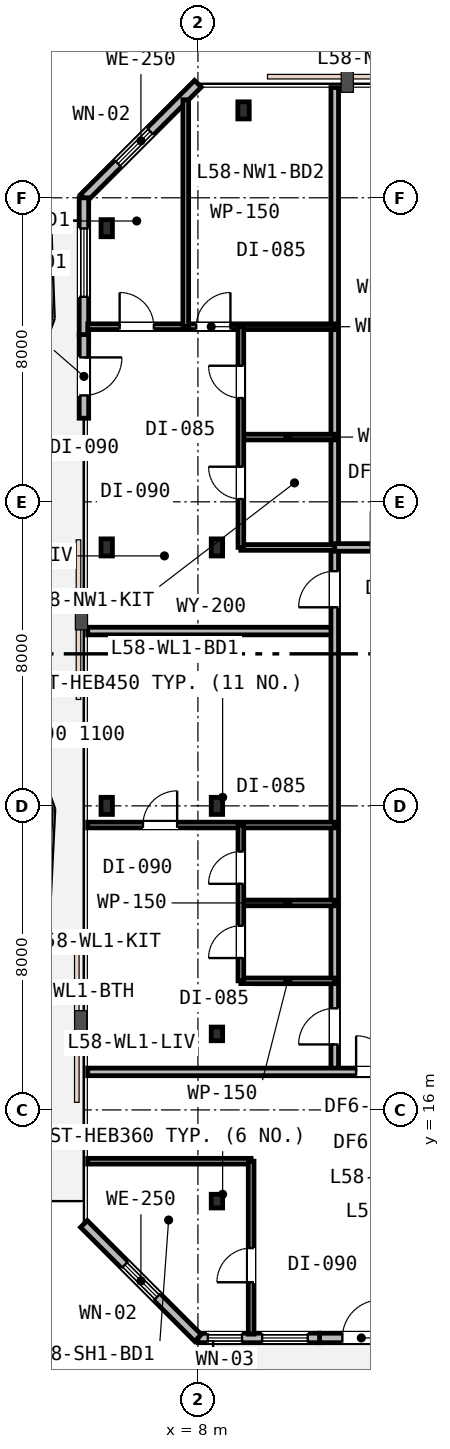
"""IFC4 building model, lengths in metres.
Left out: names, types, materials, properties, quantities, classifications, styles, units other than length and angle.
Written with IfcOpenShell. Run it as: python <this file> out.ifc"""

import sys

from ifc_helpers import new_model, si_unit, direction, frame, frame_2d, origin, origin_2d, place, context, subcontext, project, spatial, rectangle, i_section, extrude, element, fill, save


model = new_model("IFC4")
c1 = context("Model", 3, precision=1e-05, world=origin(), true_north=direction((0.0, 1.0)))
c2 = subcontext(c1, "Body", "Model", "MODEL_VIEW")
j1 = project(units=[si_unit("LENGTHUNIT", "METRE"), si_unit("PLANEANGLEUNIT", "RADIAN")], contexts=[c1])
p1 = place(None, origin())
s1 = spatial("IfcSite", under=j1, at=p1, CompositionType="ELEMENT")
p2 = place(p1, origin())
s2 = spatial("IfcBuilding", under=s1, at=p2, CompositionType="ELEMENT")
p3 = place(p2, frame((0.0, 0.0, 226.0)))
s3 = spatial("IfcBuildingStorey", under=s2, at=p3, CompositionType="ELEMENT", Elevation=226.0)
for number, where, z_axis, x_axis in (
    (1, (8.5, 24.0, 0.0), (0.0, 0.0, 1.0), (1.0, 0.0, 0.0)),
    (2, (5.6, 24.0, 0.0), (0.0, 0.0, 1.0), (1.0, 0.0, 0.0)),
    (3, (5.6, 30.8, 0.0), (0.0, 0.0, 1.0), (1.0, 0.0, 0.0)),
    (4, (5.6, 39.2, 0.0), (0.0, 0.0, 1.0), (1.0, 0.0, 0.0)),
    (5, (8.5, 30.8, 0.0), (0.0, 0.0, 1.0), (1.0, 0.0, 0.0)),
    (6, (9.2, 42.3, 0.0), (0.0, 0.0, 1.0), (1.0, 0.0, 0.0)),
):
    element("IfcColumn", number, at=place(p3, frame(where, z_axis=z_axis, x_axis=x_axis)), inside=s3, PredefinedType="COLUMN", context=c2, shape_type="SweptSolid", body=[
        extrude(i_section(OverallWidth=0.3, OverallDepth=0.45, WebThickness=0.014, FlangeThickness=0.026, FilletRadius=0.027, at=origin_2d()), origin(), (0.0, 0.0, 1.0), 3.8),
    ])
for number, where, z_axis, x_axis in (
    (7, (8.5, 13.6, 0.0), (0.0, 0.0, 1.0), (1.0, 0.0, 0.0)),
    (8, (8.5, 18.0, 0.0), (0.0, 0.0, 1.0), (1.0, 0.0, 0.0)),
):
    element("IfcColumn", number, at=place(p3, frame(where, z_axis=z_axis, x_axis=x_axis)), inside=s3, PredefinedType="COLUMN", context=c2, shape_type="SweptSolid", body=[
        extrude(i_section(OverallWidth=0.3, OverallDepth=0.36, WebThickness=0.013, FlangeThickness=0.022, FilletRadius=0.027, at=origin_2d()), origin(), (0.0, 0.0, 1.0), 3.8),
    ])
p4 = place(p3, frame((11.2, 10.0, 0.0), z_axis=(0.0, 0.0, 1.0), x_axis=(1.0, 0.0, 0.0)))
e9 = element("IfcWall", 9, at=p4, inside=s3, PredefinedType="STANDARD", context=c2, shape_type="SweptSolid", body=[
    extrude(rectangle(XDim=2.2, YDim=0.25, at=frame_2d((1.1, 0.0))), origin(), (0.0, 0.0, 1.0), 3.53),
])
p5 = place(p4, frame((0.6, 0.0, 0.0)))
e10 = element("IfcOpeningElement", 10, at=p5, cuts=e9, PredefinedType="OPENING", context=c2, shape_type="SweptSolid", body=[
    extrude(rectangle(XDim=1.0, YDim=2.15, at=frame_2d((0.5, 1.075))), frame((0.0, 0.135, 0.0), z_axis=(0.0, -1.0, 0.0), x_axis=(1.0, 0.0, 0.0)), (0.0, 0.0, 1.0), 0.27),
])
p6 = place(p3, frame((8.0, 10.0, 0.0), z_axis=(0.0, 0.0, 1.0), x_axis=(1.0, 0.0, 0.0)))
e11 = element("IfcWall", 11, at=p6, inside=s3, PredefinedType="STANDARD", context=c2, shape_type="SweptSolid", body=[
    extrude(rectangle(XDim=3.2, YDim=0.25, at=frame_2d((1.6, 0.0))), origin(), (0.0, 0.0, 1.0), 3.53),
])
p7 = place(p6, frame((0.26, 0.0, 0.9)))
e12 = element("IfcOpeningElement", 12, at=p7, cuts=e11, PredefinedType="OPENING", context=c2, shape_type="SweptSolid", body=[
    extrude(rectangle(XDim=0.9, YDim=1.55, at=frame_2d((0.45, 0.775))), frame((0.0, 0.135, 0.0), z_axis=(0.0, -1.0, 0.0), x_axis=(1.0, 0.0, 0.0)), (0.0, 0.0, 1.0), 0.27),
])
p8 = place(p6, frame((1.69, 0.0, 0.85)))
e13 = element("IfcOpeningElement", 13, at=p8, cuts=e11, PredefinedType="OPENING", context=c2, shape_type="SweptSolid", body=[
    extrude(rectangle(XDim=1.2, YDim=1.6, at=frame_2d((0.6, 0.8))), frame((0.0, 0.135, 0.0), z_axis=(0.0, -1.0, 0.0), x_axis=(1.0, 0.0, 0.0)), (0.0, 0.0, 1.0), 0.27),
])
p9 = place(p3, frame((8.0, 43.0, 0.0), z_axis=(0.0, 0.0, 1.0), x_axis=(-0.707106781187, -0.707106781187, 0.0)))
e14 = element("IfcWall", 14, at=p9, inside=s3, PredefinedType="STANDARD", context=c2, shape_type="SweptSolid", body=[
    extrude(rectangle(XDim=4.243, YDim=0.25, at=frame_2d((2.121, 0.0))), origin(), (0.0, 0.0, 1.0), 3.53),
])
p10 = place(p9, frame((1.773, 0.0, 0.85)))
e15 = element("IfcOpeningElement", 15, at=p10, cuts=e14, PredefinedType="OPENING", context=c2, shape_type="SweptSolid", body=[
    extrude(rectangle(XDim=1.2, YDim=1.6, at=frame_2d((0.6, 0.8))), frame((0.0, 0.135, 0.0), z_axis=(0.0, -1.0, 0.0), x_axis=(1.0, 0.0, 0.0)), (0.0, 0.0, 1.0), 0.27),
])
p11 = place(p3, frame((5.0, 36.4, 0.0), z_axis=(0.0, 0.0, 1.0), x_axis=(0.0, -1.0, 0.0)))
e16 = element("IfcWall", 16, at=p11, inside=s3, PredefinedType="STANDARD", context=c2, shape_type="SweptSolid", body=[
    extrude(rectangle(XDim=2.2, YDim=0.25, at=frame_2d((1.1, 0.0))), origin(), (0.0, 0.0, 1.0), 3.53),
])
p12 = place(p11, frame((0.6, 0.0, 0.0)))
e17 = element("IfcOpeningElement", 17, at=p12, cuts=e16, PredefinedType="OPENING", context=c2, shape_type="SweptSolid", body=[
    extrude(rectangle(XDim=1.0, YDim=2.15, at=frame_2d((0.5, 1.075))), frame((0.0, 0.135, 0.0), z_axis=(0.0, -1.0, 0.0), x_axis=(1.0, 0.0, 0.0)), (0.0, 0.0, 1.0), 0.27),
])
p13 = place(p3, frame((5.0, 40.0, 0.0), z_axis=(0.0, 0.0, 1.0), x_axis=(0.0, -1.0, 0.0)))
e18 = element("IfcWall", 18, at=p13, inside=s3, PredefinedType="STANDARD", context=c2, shape_type="SweptSolid", body=[
    extrude(rectangle(XDim=3.6, YDim=0.25, at=frame_2d((1.8, 0.0))), origin(), (0.0, 0.0, 1.0), 3.53),
])
p14 = place(p13, frame((0.806, 0.0, 0.75)))
e19 = element("IfcOpeningElement", 19, at=p14, cuts=e18, PredefinedType="OPENING", context=c2, shape_type="SweptSolid", body=[
    extrude(rectangle(XDim=1.8, YDim=1.85, at=frame_2d((0.9, 0.925))), frame((0.0, 0.135, 0.0), z_axis=(0.0, -1.0, 0.0), x_axis=(1.0, 0.0, 0.0)), (0.0, 0.0, 1.0), 0.27),
])
p15 = place(p3, frame((5.0, 13.0, 0.0), z_axis=(0.0, 0.0, 1.0), x_axis=(0.707106781187, -0.707106781187, 0.0)))
e20 = element("IfcWall", 20, at=p15, inside=s3, PredefinedType="STANDARD", context=c2, shape_type="SweptSolid", body=[
    extrude(rectangle(XDim=4.243, YDim=0.25, at=frame_2d((2.121, 0.0))), origin(), (0.0, 0.0, 1.0), 3.53),
])
p16 = place(p15, frame((1.521, 0.0, 0.85)))
e21 = element("IfcOpeningElement", 21, at=p16, cuts=e20, PredefinedType="OPENING", context=c2, shape_type="SweptSolid", body=[
    extrude(rectangle(XDim=1.2, YDim=1.6, at=frame_2d((0.6, 0.8))), frame((0.0, 0.135, 0.0), z_axis=(0.0, -1.0, 0.0), x_axis=(1.0, 0.0, 0.0)), (0.0, 0.0, 1.0), 0.27),
])
p17 = place(p3, frame((5.1, 28.6, 0.0), z_axis=(0.0, 0.0, 1.0), x_axis=(1.0, 0.0, 0.0)))
e22 = element("IfcWall", 22, at=p17, inside=s3, PredefinedType="PARTITIONING", context=c2, shape_type="SweptSolid", body=[
    extrude(rectangle(XDim=6.5, YDim=0.2, at=frame_2d((3.25, 0.0))), origin(), (0.0, 0.0, 1.0), 2.92),
])
p18 = place(p3, frame((11.6, 17.0, 0.0), z_axis=(0.0, 0.0, 1.0), x_axis=(0.0, 1.0, 0.0)))
e23 = element("IfcWall", 23, at=p18, inside=s3, PredefinedType="PARTITIONING", context=c2, shape_type="SweptSolid", body=[
    extrude(rectangle(XDim=25.9, YDim=0.2, at=frame_2d((12.95, 0.0))), origin(), (0.0, 0.0, 1.0), 2.92),
])
p19 = place(p18, frame((12.225, 0.0, 0.0)))
e24 = element("IfcOpeningElement", 24, at=p19, cuts=e23, PredefinedType="OPENING", context=c2, shape_type="SweptSolid", body=[
    extrude(rectangle(XDim=0.95, YDim=2.15, at=frame_2d((0.475, 1.075))), frame((0.0, 0.11, 0.0), z_axis=(0.0, -1.0, 0.0), x_axis=(1.0, 0.0, 0.0)), (0.0, 0.0, 1.0), 0.22),
])
p20 = place(p18, frame((0.723, 0.0, 0.0)))
e25 = element("IfcOpeningElement", 25, at=p20, cuts=e23, PredefinedType="OPENING", context=c2, shape_type="SweptSolid", body=[
    extrude(rectangle(XDim=0.95, YDim=2.15, at=frame_2d((0.475, 1.075))), frame((0.0, 0.11, 0.0), z_axis=(0.0, -1.0, 0.0), x_axis=(1.0, 0.0, 0.0)), (0.0, 0.0, 1.0), 0.22),
])
p21 = place(p3, frame((9.13, 30.8, 0.0), z_axis=(0.0, 0.0, 1.0), x_axis=(1.0, 0.0, 0.0)))
e26 = element("IfcWall", 26, at=p21, inside=s3, PredefinedType="PARTITIONING", context=c2, shape_type="SweptSolid", body=[
    extrude(rectangle(XDim=2.47, YDim=0.15, at=frame_2d((1.235, 0.0))), origin(), (0.0, 0.0, 1.0), 2.92),
])
p22 = place(p3, frame((9.13, 33.704, 0.0), z_axis=(0.0, 0.0, 1.0), x_axis=(1.0, 0.0, 0.0)))
e27 = element("IfcWall", 27, at=p22, inside=s3, PredefinedType="PARTITIONING", context=c2, shape_type="SweptSolid", body=[
    extrude(rectangle(XDim=2.47, YDim=0.15, at=frame_2d((1.235, 0.0))), origin(), (0.0, 0.0, 1.0), 3.53),
])
p23 = place(p3, frame((5.1, 36.608, 0.0), z_axis=(0.0, 0.0, 1.0), x_axis=(1.0, 0.0, 0.0)))
e28 = element("IfcWall", 28, at=p23, inside=s3, PredefinedType="PARTITIONING", context=c2, shape_type="SweptSolid", body=[
    extrude(rectangle(XDim=6.5, YDim=0.15, at=frame_2d((3.25, 0.0))), origin(), (0.0, 0.0, 1.0), 3.24),
])
p24 = place(p23, frame((0.84, 0.0, 0.0)))
e29 = element("IfcOpeningElement", 29, at=p24, cuts=e28, PredefinedType="OPENING", context=c2, shape_type="SweptSolid", body=[
    extrude(rectangle(XDim=0.9, YDim=2.15, at=frame_2d((0.45, 1.075))), frame((0.0, 0.085, 0.0), z_axis=(0.0, -1.0, 0.0), x_axis=(1.0, 0.0, 0.0)), (0.0, 0.0, 1.0), 0.17),
])
p25 = place(p23, frame((2.855, 0.0, 0.0)))
e30 = element("IfcOpeningElement", 30, at=p25, cuts=e28, PredefinedType="OPENING", context=c2, shape_type="SweptSolid", body=[
    extrude(rectangle(XDim=0.9, YDim=2.15, at=frame_2d((0.45, 1.075))), frame((0.0, 0.085, 0.0), z_axis=(0.0, -1.0, 0.0), x_axis=(1.0, 0.0, 0.0)), (0.0, 0.0, 1.0), 0.17),
])
p26 = place(p3, frame((9.13, 30.8, 0.0), z_axis=(0.0, 0.0, 1.0), x_axis=(0.0, 1.0, 0.0)))
e31 = element("IfcWall", 31, at=p26, inside=s3, PredefinedType="PARTITIONING", context=c2, shape_type="SweptSolid", body=[
    extrude(rectangle(XDim=5.808, YDim=0.15, at=frame_2d((2.904, 0.0))), origin(), (0.0, 0.0, 1.0), 2.92),
])
p27 = place(p26, frame((1.274, 0.0, 0.0)))
e32 = element("IfcOpeningElement", 32, at=p27, cuts=e31, PredefinedType="OPENING", context=c2, shape_type="SweptSolid", body=[
    extrude(rectangle(XDim=0.85, YDim=2.15, at=frame_2d((0.425, 1.075))), frame((0.0, 0.085, 0.0), z_axis=(0.0, -1.0, 0.0), x_axis=(1.0, 0.0, 0.0)), (0.0, 0.0, 1.0), 0.17),
])
p28 = place(p26, frame((3.931, 0.0, 0.0)))
e33 = element("IfcOpeningElement", 33, at=p28, cuts=e31, PredefinedType="OPENING", context=c2, shape_type="SweptSolid", body=[
    extrude(rectangle(XDim=0.85, YDim=2.15, at=frame_2d((0.425, 1.075))), frame((0.0, 0.085, 0.0), z_axis=(0.0, -1.0, 0.0), x_axis=(1.0, 0.0, 0.0)), (0.0, 0.0, 1.0), 0.17),
])
p29 = place(p3, frame((7.68, 36.608, 0.0), z_axis=(0.0, 0.0, 1.0), x_axis=(0.0, 1.0, 0.0)))
e34 = element("IfcWall", 34, at=p29, inside=s3, PredefinedType="PARTITIONING", context=c2, shape_type="SweptSolid", body=[
    extrude(rectangle(XDim=5.972, YDim=0.15, at=frame_2d((2.986, 0.0))), origin(), (0.0, 0.0, 1.0), 3.24),
])
p30 = place(p3, frame((11.6, 30.8, 0.0), z_axis=(0.0, 0.0, 1.0), x_axis=(1.0, 0.0, 0.0)))
e35 = element("IfcWall", 35, at=p30, inside=s3, PredefinedType="PARTITIONING", context=c2, shape_type="SweptSolid", body=[
    extrude(rectangle(XDim=2.85, YDim=0.2, at=frame_2d((1.425, 0.0))), origin(), (0.0, 0.0, 1.0), 2.92),
])
p31 = place(p30, frame((0.95, 0.0, 0.0)))
e36 = element("IfcOpeningElement", 36, at=p31, cuts=e35, PredefinedType="OPENING", context=c2, shape_type="SweptSolid", body=[
    extrude(rectangle(XDim=0.95, YDim=2.15, at=frame_2d((0.475, 1.075))), frame((0.0, 0.11, 0.0), z_axis=(0.0, -1.0, 0.0), x_axis=(1.0, 0.0, 0.0)), (0.0, 0.0, 1.0), 0.22),
])
p32 = place(p3, frame((5.1, 17.0, 0.0), z_axis=(0.0, 0.0, 1.0), x_axis=(1.0, 0.0, 0.0)))
e37 = element("IfcWall", 37, at=p32, inside=s3, PredefinedType="PARTITIONING", context=c2, shape_type="SweptSolid", body=[
    extrude(rectangle(XDim=18.8, YDim=0.2, at=frame_2d((9.4, 0.0))), origin(), (0.0, 0.0, 1.0), 2.92),
])
p33 = place(p32, frame((7.063, 0.0, 0.0)))
e38 = element("IfcOpeningElement", 38, at=p33, cuts=e37, PredefinedType="OPENING", context=c2, shape_type="SweptSolid", body=[
    extrude(rectangle(XDim=0.95, YDim=2.15, at=frame_2d((0.475, 1.075))), frame((0.0, 0.11, 0.0), z_axis=(0.0, -1.0, 0.0), x_axis=(1.0, 0.0, 0.0)), (0.0, 0.0, 1.0), 0.22),
])
for number, where, z_axis, x_axis in (
    (39, (9.13, 19.396, 0.0), (0.0, 0.0, 1.0), (1.0, 0.0, 0.0)),
    (40, (9.13, 21.446, 0.0), (0.0, 0.0, 1.0), (1.0, 0.0, 0.0)),
):
    element("IfcWall", number, at=place(p3, frame(where, z_axis=z_axis, x_axis=x_axis)), inside=s3, PredefinedType="PARTITIONING", context=c2, shape_type="SweptSolid", body=[
        extrude(rectangle(XDim=2.47, YDim=0.15, at=frame_2d((1.235, 0.0))), origin(), (0.0, 0.0, 1.0), 3.53),
    ])
p34 = place(p3, frame((5.1, 23.496, 0.0), z_axis=(0.0, 0.0, 1.0), x_axis=(1.0, 0.0, 0.0)))
e41 = element("IfcWall", 41, at=p34, inside=s3, PredefinedType="PARTITIONING", context=c2, shape_type="SweptSolid", body=[
    extrude(rectangle(XDim=6.5, YDim=0.15, at=frame_2d((3.25, 0.0))), origin(), (0.0, 0.0, 1.0), 2.92),
])
p35 = place(p34, frame((1.453, 0.0, 0.0)))
e42 = element("IfcOpeningElement", 42, at=p35, cuts=e41, PredefinedType="OPENING", context=c2, shape_type="SweptSolid", body=[
    extrude(rectangle(XDim=0.9, YDim=2.15, at=frame_2d((0.45, 1.075))), frame((0.0, 0.085, 0.0), z_axis=(0.0, -1.0, 0.0), x_axis=(1.0, 0.0, 0.0)), (0.0, 0.0, 1.0), 0.17),
])
p36 = place(p3, frame((9.13, 19.396, 0.0), z_axis=(0.0, 0.0, 1.0), x_axis=(0.0, 1.0, 0.0)))
e43 = element("IfcWall", 43, at=p36, inside=s3, PredefinedType="PARTITIONING", context=c2, shape_type="SweptSolid", body=[
    extrude(rectangle(XDim=4.1, YDim=0.15, at=frame_2d((2.05, 0.0))), origin(), (0.0, 0.0, 1.0), 2.92),
])
p37 = place(p36, frame((0.6, 0.0, 0.0)))
e44 = element("IfcOpeningElement", 44, at=p37, cuts=e43, PredefinedType="OPENING", context=c2, shape_type="SweptSolid", body=[
    extrude(rectangle(XDim=0.85, YDim=2.15, at=frame_2d((0.425, 1.075))), frame((0.0, 0.085, 0.0), z_axis=(0.0, -1.0, 0.0), x_axis=(1.0, 0.0, 0.0)), (0.0, 0.0, 1.0), 0.17),
])
p38 = place(p36, frame((2.553, 0.0, 0.0)))
e45 = element("IfcOpeningElement", 45, at=p38, cuts=e43, PredefinedType="OPENING", context=c2, shape_type="SweptSolid", body=[
    extrude(rectangle(XDim=0.85, YDim=2.15, at=frame_2d((0.425, 1.075))), frame((0.0, 0.085, 0.0), z_axis=(0.0, -1.0, 0.0), x_axis=(1.0, 0.0, 0.0)), (0.0, 0.0, 1.0), 0.17),
])
p39 = place(p3, frame((5.1, 14.65, 0.0), z_axis=(0.0, 0.0, 1.0), x_axis=(1.0, 0.0, 0.0)))
e46 = element("IfcWall", 46, at=p39, inside=s3, PredefinedType="PARTITIONING", context=c2, shape_type="SweptSolid", body=[
    extrude(rectangle(XDim=4.3, YDim=0.15, at=frame_2d((2.15, 0.0))), origin(), (0.0, 0.0, 1.0), 2.92),
])
p40 = place(p3, frame((9.4, 10.1, 0.0), z_axis=(0.0, 0.0, 1.0), x_axis=(0.0, 1.0, 0.0)))
e47 = element("IfcWall", 47, at=p40, inside=s3, PredefinedType="PARTITIONING", context=c2, shape_type="SweptSolid", body=[
    extrude(rectangle(XDim=4.55, YDim=0.15, at=frame_2d((2.275, 0.0))), origin(), (0.0, 0.0, 1.0), 2.92),
])
p41 = place(p40, frame((1.365, 0.0, 0.0)))
e48 = element("IfcOpeningElement", 48, at=p41, cuts=e47, PredefinedType="OPENING", context=c2, shape_type="SweptSolid", body=[
    extrude(rectangle(XDim=0.9, YDim=2.15, at=frame_2d((0.45, 1.075))), frame((0.0, 0.085, 0.0), z_axis=(0.0, -1.0, 0.0), x_axis=(1.0, 0.0, 0.0)), (0.0, 0.0, 1.0), 0.17),
])
p42 = place(p5, origin())
e49 = element("IfcDoor", 49, at=p42, inside=s3, OperationType="SINGLE_SWING_RIGHT", PredefinedType="DOOR", context=c2, shape_type="SweptSolid", body=[
    extrude(rectangle(XDim=1.0, YDim=2.15, at=frame_2d((0.5, 1.075))), frame((0.0, 0.025, 0.0), z_axis=(0.0, -1.0, 0.0), x_axis=(1.0, 0.0, 0.0)), (0.0, 0.0, 1.0), 0.05),
])
fill(e10, e49)
p43 = place(p7, origin())
e50 = element("IfcWindow", 50, at=p43, inside=s3, PartitioningType="SINGLE_PANEL", PredefinedType="WINDOW", context=c2, shape_type="SweptSolid", body=[
    extrude(rectangle(XDim=0.9, YDim=1.55, at=frame_2d((0.45, 0.775))), frame((0.0, 0.03, 0.0), z_axis=(0.0, -1.0, 0.0), x_axis=(1.0, 0.0, 0.0)), (0.0, 0.0, 1.0), 0.06),
])
fill(e12, e50)
p44 = place(p8, origin())
e51 = element("IfcWindow", 51, at=p44, inside=s3, PartitioningType="SINGLE_PANEL", PredefinedType="WINDOW", context=c2, shape_type="SweptSolid", body=[
    extrude(rectangle(XDim=1.2, YDim=1.6, at=frame_2d((0.6, 0.8))), frame((0.0, 0.03, 0.0), z_axis=(0.0, -1.0, 0.0), x_axis=(1.0, 0.0, 0.0)), (0.0, 0.0, 1.0), 0.06),
])
fill(e13, e51)
p45 = place(p10, origin())
e52 = element("IfcWindow", 52, at=p45, inside=s3, PartitioningType="SINGLE_PANEL", PredefinedType="WINDOW", context=c2, shape_type="SweptSolid", body=[
    extrude(rectangle(XDim=1.2, YDim=1.6, at=frame_2d((0.6, 0.8))), frame((0.0, 0.03, 0.0), z_axis=(0.0, -1.0, 0.0), x_axis=(1.0, 0.0, 0.0)), (0.0, 0.0, 1.0), 0.06),
])
fill(e15, e52)
p46 = place(p12, origin())
e53 = element("IfcDoor", 53, at=p46, inside=s3, OperationType="SINGLE_SWING_LEFT", PredefinedType="DOOR", context=c2, shape_type="SweptSolid", body=[
    extrude(rectangle(XDim=1.0, YDim=2.15, at=frame_2d((0.5, 1.075))), frame((0.0, 0.025, 0.0), z_axis=(0.0, -1.0, 0.0), x_axis=(1.0, 0.0, 0.0)), (0.0, 0.0, 1.0), 0.05),
])
fill(e17, e53)
p47 = place(p14, origin())
e54 = element("IfcWindow", 54, at=p47, inside=s3, PartitioningType="SINGLE_PANEL", PredefinedType="WINDOW", context=c2, shape_type="SweptSolid", body=[
    extrude(rectangle(XDim=1.8, YDim=1.85, at=frame_2d((0.9, 0.925))), frame((0.0, 0.03, 0.0), z_axis=(0.0, -1.0, 0.0), x_axis=(1.0, 0.0, 0.0)), (0.0, 0.0, 1.0), 0.06),
])
fill(e19, e54)
p48 = place(p16, origin())
e55 = element("IfcWindow", 55, at=p48, inside=s3, PartitioningType="SINGLE_PANEL", PredefinedType="WINDOW", context=c2, shape_type="SweptSolid", body=[
    extrude(rectangle(XDim=1.2, YDim=1.6, at=frame_2d((0.6, 0.8))), frame((0.0, 0.03, 0.0), z_axis=(0.0, -1.0, 0.0), x_axis=(1.0, 0.0, 0.0)), (0.0, 0.0, 1.0), 0.06),
])
fill(e21, e55)
p49 = place(p19, origin())
e56 = element("IfcDoor", 56, at=p49, inside=s3, OperationType="SINGLE_SWING_LEFT", PredefinedType="DOOR", context=c2, shape_type="SweptSolid", body=[
    extrude(rectangle(XDim=0.95, YDim=2.15, at=frame_2d((0.475, 1.075))), frame((0.0, 0.025, 0.0), z_axis=(0.0, -1.0, 0.0), x_axis=(1.0, 0.0, 0.0)), (0.0, 0.0, 1.0), 0.05),
])
fill(e24, e56)
p50 = place(p27, origin())
e57 = element("IfcDoor", 57, at=p50, inside=s3, OperationType="SINGLE_SWING_RIGHT", PredefinedType="DOOR", context=c2, shape_type="SweptSolid", body=[
    extrude(rectangle(XDim=0.85, YDim=2.15, at=frame_2d((0.425, 1.075))), frame((0.0, 0.025, 0.0), z_axis=(0.0, -1.0, 0.0), x_axis=(1.0, 0.0, 0.0)), (0.0, 0.0, 1.0), 0.05),
])
fill(e32, e57)
p51 = place(p28, origin())
e58 = element("IfcDoor", 58, at=p51, inside=s3, OperationType="SINGLE_SWING_RIGHT", PredefinedType="DOOR", context=c2, shape_type="SweptSolid", body=[
    extrude(rectangle(XDim=0.85, YDim=2.15, at=frame_2d((0.425, 1.075))), frame((0.0, 0.025, 0.0), z_axis=(0.0, -1.0, 0.0), x_axis=(1.0, 0.0, 0.0)), (0.0, 0.0, 1.0), 0.05),
])
fill(e33, e58)
p52 = place(p24, origin())
e59 = element("IfcDoor", 59, at=p52, inside=s3, OperationType="SINGLE_SWING_LEFT", PredefinedType="DOOR", context=c2, shape_type="SweptSolid", body=[
    extrude(rectangle(XDim=0.9, YDim=2.15, at=frame_2d((0.45, 1.075))), frame((0.0, 0.025, 0.0), z_axis=(0.0, -1.0, 0.0), x_axis=(1.0, 0.0, 0.0)), (0.0, 0.0, 1.0), 0.05),
])
fill(e29, e59)
p53 = place(p25, origin())
e60 = element("IfcDoor", 60, at=p53, inside=s3, OperationType="SINGLE_SWING_RIGHT", PredefinedType="DOOR", context=c2, shape_type="SweptSolid", body=[
    extrude(rectangle(XDim=0.9, YDim=2.15, at=frame_2d((0.45, 1.075))), frame((0.0, 0.025, 0.0), z_axis=(0.0, -1.0, 0.0), x_axis=(1.0, 0.0, 0.0)), (0.0, 0.0, 1.0), 0.05),
])
fill(e30, e60)
p54 = place(p20, origin())
e61 = element("IfcDoor", 61, at=p54, inside=s3, OperationType="SINGLE_SWING_LEFT", PredefinedType="DOOR", context=c2, shape_type="SweptSolid", body=[
    extrude(rectangle(XDim=0.95, YDim=2.15, at=frame_2d((0.475, 1.075))), frame((0.0, 0.025, 0.0), z_axis=(0.0, -1.0, 0.0), x_axis=(1.0, 0.0, 0.0)), (0.0, 0.0, 1.0), 0.05),
])
fill(e25, e61)
p55 = place(p37, origin())
e62 = element("IfcDoor", 62, at=p55, inside=s3, OperationType="SINGLE_SWING_LEFT", PredefinedType="DOOR", context=c2, shape_type="SweptSolid", body=[
    extrude(rectangle(XDim=0.85, YDim=2.15, at=frame_2d((0.425, 1.075))), frame((0.0, 0.025, 0.0), z_axis=(0.0, -1.0, 0.0), x_axis=(1.0, 0.0, 0.0)), (0.0, 0.0, 1.0), 0.05),
])
fill(e44, e62)
p56 = place(p38, origin())
e63 = element("IfcDoor", 63, at=p56, inside=s3, OperationType="SINGLE_SWING_LEFT", PredefinedType="DOOR", context=c2, shape_type="SweptSolid", body=[
    extrude(rectangle(XDim=0.85, YDim=2.15, at=frame_2d((0.425, 1.075))), frame((0.0, 0.025, 0.0), z_axis=(0.0, -1.0, 0.0), x_axis=(1.0, 0.0, 0.0)), (0.0, 0.0, 1.0), 0.05),
])
fill(e45, e63)
p57 = place(p35, origin())
e64 = element("IfcDoor", 64, at=p57, inside=s3, OperationType="SINGLE_SWING_RIGHT", PredefinedType="DOOR", context=c2, shape_type="SweptSolid", body=[
    extrude(rectangle(XDim=0.9, YDim=2.15, at=frame_2d((0.45, 1.075))), frame((0.0, 0.025, 0.0), z_axis=(0.0, -1.0, 0.0), x_axis=(1.0, 0.0, 0.0)), (0.0, 0.0, 1.0), 0.05),
])
fill(e42, e64)
p58 = place(p33, origin())
e65 = element("IfcDoor", 65, at=p58, inside=s3, OperationType="SINGLE_SWING_LEFT", PredefinedType="DOOR", context=c2, shape_type="SweptSolid", body=[
    extrude(rectangle(XDim=0.95, YDim=2.15, at=frame_2d((0.475, 1.075))), frame((0.0, 0.025, 0.0), z_axis=(0.0, -1.0, 0.0), x_axis=(1.0, 0.0, 0.0)), (0.0, 0.0, 1.0), 0.05),
])
fill(e38, e65)
p59 = place(p41, origin())
e66 = element("IfcDoor", 66, at=p59, inside=s3, OperationType="SINGLE_SWING_LEFT", PredefinedType="DOOR", context=c2, shape_type="SweptSolid", body=[
    extrude(rectangle(XDim=0.9, YDim=2.15, at=frame_2d((0.45, 1.075))), frame((0.0, 0.025, 0.0), z_axis=(0.0, -1.0, 0.0), x_axis=(1.0, 0.0, 0.0)), (0.0, 0.0, 1.0), 0.05),
])
fill(e48, e66)
save(model, sys.argv[1])
